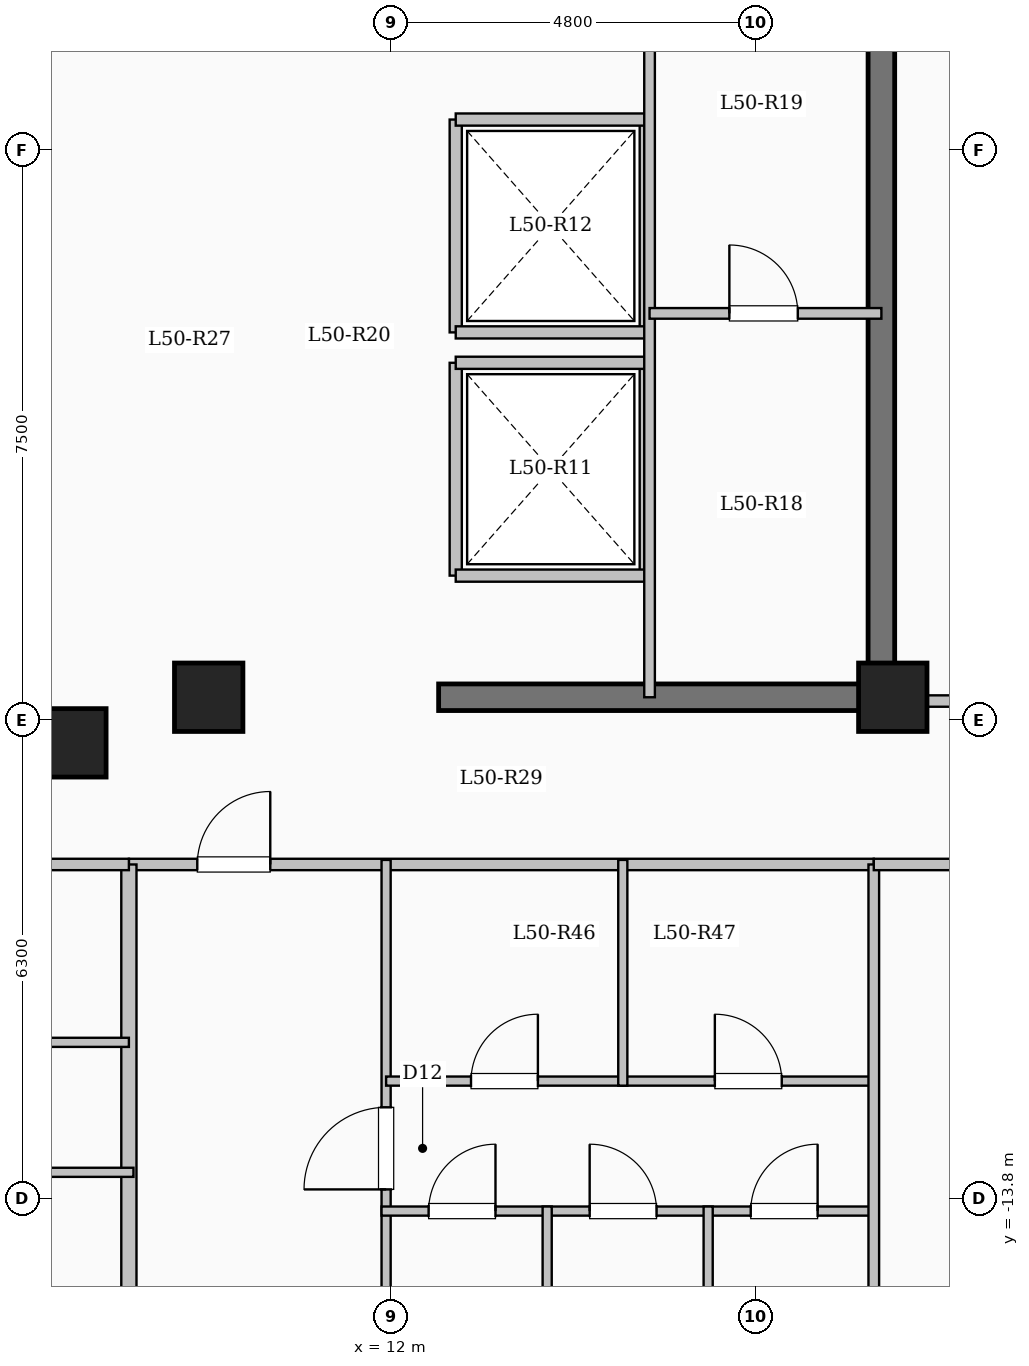
"""IFC4 building model, lengths in metres.
Left out: names, types, materials, properties, quantities, classifications, styles, units other than length and angle.
Written with IfcOpenShell. Run it as: python <this file> out.ifc"""

import sys

from ifc_helpers import new_model, si_unit, direction, frame, frame_2d, origin, origin_2d, place, context, subcontext, project, spatial, rectangle, extrude, element, fill, save


model = new_model("IFC4")
c1 = context("Model", 3, precision=1e-05, world=origin(), true_north=direction((0.0, 1.0)))
c2 = subcontext(c1, "Body", "Model", "MODEL_VIEW")
j1 = project(units=[si_unit("LENGTHUNIT", "METRE"), si_unit("PLANEANGLEUNIT", "RADIAN")], contexts=[c1])
p1 = place(None, origin())
s1 = spatial("IfcSite", under=j1, at=p1, CompositionType="ELEMENT")
p2 = place(p1, origin())
s2 = spatial("IfcBuilding", under=s1, at=p2, CompositionType="ELEMENT")
p3 = place(p2, frame((0.0, 0.0, 186.9)))
s3 = spatial("IfcBuildingStorey", under=s2, at=p3, CompositionType="ELEMENT", Elevation=186.9)
for number, where, z_axis, x_axis in (
    (1, (7.8, -7.8, 0.0), (0.0, 0.0, 1.0), (1.0, 0.0, 0.0)),
    (2, (9.6, -7.2, 0.0), (0.0, 0.0, 1.0), (1.0, 0.0, 0.0)),
    (3, (18.6, -7.2, 0.0), (0.0, 0.0, 1.0), (1.0, 0.0, 0.0)),
):
    element("IfcColumn", number, at=place(p3, frame(where, z_axis=z_axis, x_axis=x_axis)), inside=s3, PredefinedType="COLUMN", context=c2, shape_type="SweptSolid", body=[
        extrude(rectangle(XDim=0.9, YDim=0.9, at=origin_2d()), origin(), (0.0, 0.0, 1.0), 3.35),
    ])
for number, where, z_axis, x_axis in (
    (4, (12.85, -5.6, 0.0), (0.0, 0.0, 1.0), (0.0, 1.0, 0.0)),
    (5, (15.35, -5.6, 0.0), (0.0, 0.0, 1.0), (0.0, 1.0, 0.0)),
):
    element("IfcWall", number, at=place(p3, frame(where, z_axis=z_axis, x_axis=x_axis)), inside=s3, PredefinedType="SOLIDWALL", context=c2, shape_type="SweptSolid", body=[
        extrude(rectangle(XDim=2.8, YDim=0.16, at=frame_2d((1.4, 0.0))), origin(), (0.0, 0.0, 1.0), 3.1),
    ])
for number, where, z_axis, x_axis in (
    (6, (12.85, -5.6, 0.0), (0.0, 0.0, 1.0), (1.0, 0.0, 0.0)),
    (7, (12.85, -2.8, 0.0), (0.0, 0.0, 1.0), (1.0, 0.0, 0.0)),
):
    element("IfcWall", number, at=place(p3, frame(where, z_axis=z_axis, x_axis=x_axis)), inside=s3, PredefinedType="SOLIDWALL", context=c2, shape_type="SweptSolid", body=[
        extrude(rectangle(XDim=2.5, YDim=0.16, at=frame_2d((1.25, 0.0))), origin(), (0.0, 0.0, 1.0), 3.1),
    ])
for number, where, z_axis, x_axis in (
    (8, (12.85, -2.4, 0.0), (0.0, 0.0, 1.0), (0.0, 1.0, 0.0)),
    (9, (15.35, -2.4, 0.0), (0.0, 0.0, 1.0), (0.0, 1.0, 0.0)),
):
    element("IfcWall", number, at=place(p3, frame(where, z_axis=z_axis, x_axis=x_axis)), inside=s3, PredefinedType="SOLIDWALL", context=c2, shape_type="SweptSolid", body=[
        extrude(rectangle(XDim=2.8, YDim=0.16, at=frame_2d((1.4, 0.0))), origin(), (0.0, 0.0, 1.0), 3.1),
    ])
for number, where, z_axis, x_axis in (
    (10, (12.85, -2.4, 0.0), (0.0, 0.0, 1.0), (1.0, 0.0, 0.0)),
    (11, (12.85, 0.4, 0.0), (0.0, 0.0, 1.0), (1.0, 0.0, 0.0)),
):
    element("IfcWall", number, at=place(p3, frame(where, z_axis=z_axis, x_axis=x_axis)), inside=s3, PredefinedType="SOLIDWALL", context=c2, shape_type="SweptSolid", body=[
        extrude(rectangle(XDim=2.5, YDim=0.16, at=frame_2d((1.25, 0.0))), origin(), (0.0, 0.0, 1.0), 3.1),
    ])
p4 = place(p3, frame((18.45, -7.375, 0.0), z_axis=(0.0, 0.0, 1.0), x_axis=(0.0, 1.0, 0.0)))
e12 = element("IfcWall", 12, at=p4, inside=s3, PredefinedType="SHEAR", context=c2, shape_type="SweptSolid", body=[
    extrude(rectangle(XDim=14.05, YDim=0.35, at=frame_2d((7.025, 0.0))), origin(), (0.0, 0.0, 1.0), 3.35),
])
p5 = place(p3, frame((12.625, -7.2, 0.0), z_axis=(0.0, 0.0, 1.0), x_axis=(1.0, 0.0, 0.0)))
e13 = element("IfcWall", 13, at=p5, inside=s3, PredefinedType="SHEAR", context=c2, shape_type="SweptSolid", body=[
    extrude(rectangle(XDim=6.0, YDim=0.35, at=frame_2d((3.0, 0.0))), origin(), (0.0, 0.0, 1.0), 3.35),
])
p6 = place(p3, frame((15.4, -7.2, 0.0), z_axis=(0.0, 0.0, 1.0), x_axis=(0.0, 1.0, 0.0)))
e14 = element("IfcWall", 14, at=p6, inside=s3, PredefinedType="PARTITIONING", context=c2, shape_type="SweptSolid", body=[
    extrude(rectangle(XDim=10.45, YDim=0.14, at=frame_2d((5.225, 0.0))), origin(), (0.0, 0.0, 1.0), 3.1),
])
p7 = place(p6, frame((9.25, 0.0, 0.0)))
e15 = element("IfcOpeningElement", 15, at=p7, cuts=e14, PredefinedType="OPENING", context=c2, shape_type="SweptSolid", body=[
    extrude(rectangle(XDim=0.9, YDim=2.08, at=frame_2d((0.45, 1.04))), frame((0.0, 0.08, 0.0), z_axis=(0.0, -1.0, 0.0), x_axis=(1.0, 0.0, 0.0)), (0.0, 0.0, 1.0), 0.16),
])
p8 = place(p3, frame((15.4, -2.15, 0.0), z_axis=(0.0, 0.0, 1.0), x_axis=(1.0, 0.0, 0.0)))
e16 = element("IfcWall", 16, at=p8, inside=s3, PredefinedType="PARTITIONING", context=c2, shape_type="SweptSolid", body=[
    extrude(rectangle(XDim=3.05, YDim=0.14, at=frame_2d((1.525, 0.0))), origin(), (0.0, 0.0, 1.0), 3.1),
])
p9 = place(p8, frame((1.05, 0.0, 0.0)))
e17 = element("IfcOpeningElement", 17, at=p9, cuts=e16, PredefinedType="OPENING", context=c2, shape_type="SweptSolid", body=[
    extrude(rectangle(XDim=0.9, YDim=2.08, at=frame_2d((0.45, 1.04))), frame((0.0, 0.08, 0.0), z_axis=(0.0, -1.0, 0.0), x_axis=(1.0, 0.0, 0.0)), (0.0, 0.0, 1.0), 0.16),
])
p10 = place(p3, frame((8.55, -9.4, 0.0), z_axis=(0.0, 0.0, 1.0), x_axis=(1.0, 0.0, 0.0)))
e18 = element("IfcWall", 18, at=p10, inside=s3, PredefinedType="PARTITIONING", context=c2, shape_type="SweptSolid", body=[
    extrude(rectangle(XDim=9.8, YDim=0.15, at=frame_2d((4.9, 0.0))), origin(), (0.0, 0.0, 1.0), 3.1),
])
p11 = place(p10, frame((0.9, 0.0, 0.0)))
e19 = element("IfcOpeningElement", 19, at=p11, cuts=e18, PredefinedType="OPENING", context=c2, shape_type="SweptSolid", body=[
    extrude(rectangle(XDim=0.96, YDim=2.15, at=frame_2d((0.48, 1.075))), frame((0.0, 0.085, 0.0), z_axis=(0.0, -1.0, 0.0), x_axis=(1.0, 0.0, 0.0)), (0.0, 0.0, 1.0), 0.17),
])
p12 = place(p3, frame((11.934, -20.9, 0.0), z_axis=(0.0, 0.0, 1.0), x_axis=(0.0, 1.0, 0.0)))
e20 = element("IfcWall", 20, at=p12, inside=s3, PredefinedType="PARTITIONING", context=c2, shape_type="SweptSolid", body=[
    extrude(rectangle(XDim=11.56, YDim=0.12, at=frame_2d((5.78, 0.0))), origin(), (0.0, 0.0, 1.0), 3.1),
])
p13 = place(p12, frame((7.225, 0.0, 0.0)))
e21 = element("IfcOpeningElement", 21, at=p13, cuts=e20, PredefinedType="OPENING", context=c2, shape_type="SweptSolid", body=[
    extrude(rectangle(XDim=1.08, YDim=2.15, at=frame_2d((0.54, 1.075))), frame((0.0, 0.07, 0.0), z_axis=(0.0, -1.0, 0.0), x_axis=(1.0, 0.0, 0.0)), (0.0, 0.0, 1.0), 0.14),
])
p14 = place(p3, frame((11.934, -12.25, 0.0), z_axis=(0.0, 0.0, 1.0), x_axis=(1.0, 0.0, 0.0)))
e22 = element("IfcWall", 22, at=p14, inside=s3, PredefinedType="PARTITIONING", context=c2, shape_type="SweptSolid", body=[
    extrude(rectangle(XDim=3.114, YDim=0.12, at=frame_2d((1.557, 0.0))), origin(), (0.0, 0.0, 1.0), 2.725),
])
p15 = place(p14, frame((1.117, 0.0, 0.0)))
e23 = element("IfcOpeningElement", 23, at=p15, cuts=e22, PredefinedType="OPENING", context=c2, shape_type="SweptSolid", body=[
    extrude(rectangle(XDim=0.88, YDim=2.1, at=frame_2d((0.44, 1.05))), frame((0.0, 0.07, 0.0), z_axis=(0.0, -1.0, 0.0), x_axis=(1.0, 0.0, 0.0)), (0.0, 0.0, 1.0), 0.14),
])
p16 = place(p3, frame((15.048, -12.25, 0.0), z_axis=(0.0, 0.0, 1.0), x_axis=(1.0, 0.0, 0.0)))
e24 = element("IfcWall", 24, at=p16, inside=s3, PredefinedType="PARTITIONING", context=c2, shape_type="SweptSolid", body=[
    extrude(rectangle(XDim=3.302, YDim=0.12, at=frame_2d((1.651, 0.0))), origin(), (0.0, 0.0, 1.0), 3.1),
])
p17 = place(p16, frame((1.211, 0.0, 0.0)))
e25 = element("IfcOpeningElement", 25, at=p17, cuts=e24, PredefinedType="OPENING", context=c2, shape_type="SweptSolid", body=[
    extrude(rectangle(XDim=0.88, YDim=2.1, at=frame_2d((0.44, 1.05))), frame((0.0, 0.07, 0.0), z_axis=(0.0, -1.0, 0.0), x_axis=(1.0, 0.0, 0.0)), (0.0, 0.0, 1.0), 0.14),
])
p18 = place(p3, frame((11.874, -13.96, 0.0), z_axis=(0.0, 0.0, 1.0), x_axis=(1.0, 0.0, 0.0)))
e26 = element("IfcWall", 26, at=p18, inside=s3, PredefinedType="PARTITIONING", context=c2, shape_type="SweptSolid", body=[
    extrude(rectangle(XDim=6.536, YDim=0.12, at=frame_2d((3.268, 0.0))), origin(), (0.0, 0.0, 1.0), 2.725),
])
p19 = place(p18, frame((0.619, 0.0, 0.0)))
e27 = element("IfcOpeningElement", 27, at=p19, cuts=e26, PredefinedType="OPENING", context=c2, shape_type="SweptSolid", body=[
    extrude(rectangle(XDim=0.88, YDim=2.1, at=frame_2d((0.44, 1.05))), frame((0.0, 0.07, 0.0), z_axis=(0.0, -1.0, 0.0), x_axis=(1.0, 0.0, 0.0)), (0.0, 0.0, 1.0), 0.14),
])
p20 = place(p18, frame((2.738, 0.0, 0.0)))
e28 = element("IfcOpeningElement", 28, at=p20, cuts=e26, PredefinedType="OPENING", context=c2, shape_type="SweptSolid", body=[
    extrude(rectangle(XDim=0.88, YDim=2.1, at=frame_2d((0.44, 1.05))), frame((0.0, 0.07, 0.0), z_axis=(0.0, -1.0, 0.0), x_axis=(1.0, 0.0, 0.0)), (0.0, 0.0, 1.0), 0.14),
])
p21 = place(p18, frame((4.857, 0.0, 0.0)))
e29 = element("IfcOpeningElement", 29, at=p21, cuts=e26, PredefinedType="OPENING", context=c2, shape_type="SweptSolid", body=[
    extrude(rectangle(XDim=0.88, YDim=2.1, at=frame_2d((0.44, 1.05))), frame((0.0, 0.07, 0.0), z_axis=(0.0, -1.0, 0.0), x_axis=(1.0, 0.0, 0.0)), (0.0, 0.0, 1.0), 0.14),
])
p22 = place(p3, frame((15.048, -12.31, 0.0), z_axis=(0.0, 0.0, 1.0), x_axis=(0.0, 1.0, 0.0)))
e30 = element("IfcWall", 30, at=p22, inside=s3, PredefinedType="PARTITIONING", context=c2, shape_type="SweptSolid", body=[
    extrude(rectangle(XDim=2.97, YDim=0.12, at=frame_2d((1.485, 0.0))), origin(), (0.0, 0.0, 1.0), 2.585),
])
for number, where, z_axis, x_axis in (
    (31, (14.053, -20.9, 0.0), (0.0, 0.0, 1.0), (0.0, 1.0, 0.0)),
    (32, (16.171, -20.9, 0.0), (0.0, 0.0, 1.0), (0.0, 1.0, 0.0)),
):
    element("IfcWall", number, at=place(p3, frame(where, z_axis=z_axis, x_axis=x_axis)), inside=s3, PredefinedType="PARTITIONING", context=c2, shape_type="SweptSolid", body=[
        extrude(rectangle(XDim=7.0, YDim=0.12, at=frame_2d((3.5, 0.0))), origin(), (0.0, 0.0, 1.0), 3.1),
    ])
p23 = place(p3, frame((8.55, -21.504, 0.0), z_axis=(0.0, 0.0, 1.0), x_axis=(0.0, 1.0, 0.0)))
e33 = element("IfcWall", 33, at=p23, inside=s3, PredefinedType="SOLIDWALL", context=c2, shape_type="SweptSolid", body=[
    extrude(rectangle(XDim=12.104, YDim=0.2, at=frame_2d((6.052, 0.0))), origin(), (0.0, 0.0, 1.0), 3.1),
])
p24 = place(p3, frame((-8.55, -9.4, 0.0), z_axis=(0.0, 0.0, 1.0), x_axis=(1.0, 0.0, 0.0)))
e34 = element("IfcWall", 34, at=p24, inside=s3, PredefinedType="PARTITIONING", context=c2, shape_type="SweptSolid", body=[
    extrude(rectangle(XDim=17.1, YDim=0.15, at=frame_2d((8.55, 0.0))), origin(), (0.0, 0.0, 1.0), 3.1),
])
p25 = place(p24, frame((1.9, 0.0, 0.0)))
e35 = element("IfcOpeningElement", 35, at=p25, cuts=e34, PredefinedType="OPENING", context=c2, shape_type="SweptSolid", body=[
    extrude(rectangle(XDim=0.96, YDim=2.15, at=frame_2d((0.48, 1.075))), frame((0.0, 0.085, 0.0), z_axis=(0.0, -1.0, 0.0), x_axis=(1.0, 0.0, 0.0)), (0.0, 0.0, 1.0), 0.17),
])
p26 = place(p3, frame((3.697, -11.74, 0.0), z_axis=(0.0, 0.0, 1.0), x_axis=(1.0, 0.0, 0.0)))
e36 = element("IfcWall", 36, at=p26, inside=s3, PredefinedType="PARTITIONING", context=c2, shape_type="SweptSolid", body=[
    extrude(rectangle(XDim=4.853, YDim=0.12, at=frame_2d((2.427, 0.0))), origin(), (0.0, 0.0, 1.0), 3.1),
])
p27 = place(p26, frame((1.987, 0.0, 0.0)))
e37 = element("IfcOpeningElement", 37, at=p27, cuts=e36, PredefinedType="OPENING", context=c2, shape_type="SweptSolid", body=[
    extrude(rectangle(XDim=0.88, YDim=2.1, at=frame_2d((0.44, 1.05))), frame((0.0, 0.07, 0.0), z_axis=(0.0, -1.0, 0.0), x_axis=(1.0, 0.0, 0.0)), (0.0, 0.0, 1.0), 0.14),
])
p28 = place(p3, frame((-1.756, -13.45, 0.0), z_axis=(0.0, 0.0, 1.0), x_axis=(1.0, 0.0, 0.0)))
e38 = element("IfcWall", 38, at=p28, inside=s3, PredefinedType="PARTITIONING", context=c2, shape_type="SweptSolid", body=[
    extrude(rectangle(XDim=10.366, YDim=0.12, at=frame_2d((5.183, 0.0))), origin(), (0.0, 0.0, 1.0), 3.1),
])
p29 = place(p28, frame((1.256, 0.0, 0.0)))
e39 = element("IfcOpeningElement", 39, at=p29, cuts=e38, PredefinedType="OPENING", context=c2, shape_type="SweptSolid", body=[
    extrude(rectangle(XDim=0.88, YDim=2.1, at=frame_2d((0.44, 1.05))), frame((0.0, 0.07, 0.0), z_axis=(0.0, -1.0, 0.0), x_axis=(1.0, 0.0, 0.0)), (0.0, 0.0, 1.0), 0.14),
])
p30 = place(p28, frame((4.648, 0.0, 0.0)))
e40 = element("IfcOpeningElement", 40, at=p30, cuts=e38, PredefinedType="OPENING", context=c2, shape_type="SweptSolid", body=[
    extrude(rectangle(XDim=0.88, YDim=2.1, at=frame_2d((0.44, 1.05))), frame((0.0, 0.07, 0.0), z_axis=(0.0, -1.0, 0.0), x_axis=(1.0, 0.0, 0.0)), (0.0, 0.0, 1.0), 0.14),
])
p31 = place(p28, frame((8.04, 0.0, 0.0)))
e41 = element("IfcOpeningElement", 41, at=p31, cuts=e38, PredefinedType="OPENING", context=c2, shape_type="SweptSolid", body=[
    extrude(rectangle(XDim=0.88, YDim=2.1, at=frame_2d((0.44, 1.05))), frame((0.0, 0.07, 0.0), z_axis=(0.0, -1.0, 0.0), x_axis=(1.0, 0.0, 0.0)), (0.0, 0.0, 1.0), 0.14),
])
p32 = place(p3, frame((18.45, -7.25, 0.0), z_axis=(0.0, 0.0, 1.0), x_axis=(1.0, 0.0, 0.0)))
e42 = element("IfcWall", 42, at=p32, inside=s3, PredefinedType="PARTITIONING", context=c2, shape_type="SweptSolid", body=[
    extrude(rectangle(XDim=5.13, YDim=0.15, at=frame_2d((2.565, 0.0))), origin(), (0.0, 0.0, 1.0), 3.1),
])
p33 = place(p32, frame((1.95, 0.0, 0.0)))
e43 = element("IfcOpeningElement", 43, at=p33, cuts=e42, PredefinedType="OPENING", context=c2, shape_type="SweptSolid", body=[
    extrude(rectangle(XDim=1.08, YDim=2.15, at=frame_2d((0.54, 1.075))), frame((0.0, 0.085, 0.0), z_axis=(0.0, -1.0, 0.0), x_axis=(1.0, 0.0, 0.0)), (0.0, 0.0, 1.0), 0.17),
])
p34 = place(p3, frame((18.35, -17.25, 0.0), z_axis=(0.0, 0.0, 1.0), x_axis=(0.0, 1.0, 0.0)))
e44 = element("IfcWall", 44, at=p34, inside=s3, PredefinedType="PARTITIONING", context=c2, shape_type="SweptSolid", body=[
    extrude(rectangle(XDim=7.85, YDim=0.14, at=frame_2d((3.925, 0.0))), origin(), (0.0, 0.0, 1.0), 3.1),
])
p35 = place(p3, frame((18.35, -9.4, 0.0), z_axis=(0.0, 0.0, 1.0), x_axis=(1.0, 0.0, 0.0)))
e45 = element("IfcWall", 45, at=p35, inside=s3, PredefinedType="PARTITIONING", context=c2, shape_type="SweptSolid", body=[
    extrude(rectangle(XDim=5.23, YDim=0.15, at=frame_2d((2.615, 0.0))), origin(), (0.0, 0.0, 1.0), 3.1),
])
p36 = place(p35, frame((2.14, 0.0, 0.0)))
e46 = element("IfcOpeningElement", 46, at=p36, cuts=e45, PredefinedType="OPENING", context=c2, shape_type="SweptSolid", body=[
    extrude(rectangle(XDim=0.95, YDim=2.15, at=frame_2d((0.475, 1.075))), frame((0.0, 0.085, 0.0), z_axis=(0.0, -1.0, 0.0), x_axis=(1.0, 0.0, 0.0)), (0.0, 0.0, 1.0), 0.17),
])
p37 = place(p9, origin())
e47 = element("IfcDoor", 47, at=p37, inside=s3, OperationType="SINGLE_SWING_LEFT", PredefinedType="DOOR", context=c2, shape_type="SweptSolid", body=[
    extrude(rectangle(XDim=0.9, YDim=2.08, at=frame_2d((0.45, 1.04))), frame((0.0, 0.025, 0.0), z_axis=(0.0, -1.0, 0.0), x_axis=(1.0, 0.0, 0.0)), (0.0, 0.0, 1.0), 0.05),
])
fill(e17, e47)
p38 = place(p11, origin())
e48 = element("IfcDoor", 48, at=p38, inside=s3, OperationType="SINGLE_SWING_RIGHT", PredefinedType="DOOR", context=c2, shape_type="SweptSolid", body=[
    extrude(rectangle(XDim=0.96, YDim=2.15, at=frame_2d((0.48, 1.075))), frame((0.0, 0.025, 0.0), z_axis=(0.0, -1.0, 0.0), x_axis=(1.0, 0.0, 0.0)), (0.0, 0.0, 1.0), 0.05),
])
fill(e19, e48)
p39 = place(p13, origin())
e49 = element("IfcDoor", 49, at=p39, inside=s3, OperationType="SINGLE_SWING_LEFT", PredefinedType="DOOR", context=c2, shape_type="SweptSolid", body=[
    extrude(rectangle(XDim=1.08, YDim=2.15, at=frame_2d((0.54, 1.075))), frame((0.0, 0.025, 0.0), z_axis=(0.0, -1.0, 0.0), x_axis=(1.0, 0.0, 0.0)), (0.0, 0.0, 1.0), 0.05),
])
fill(e21, e49)
p40 = place(p15, origin())
e50 = element("IfcDoor", 50, at=p40, inside=s3, OperationType="SINGLE_SWING_RIGHT", PredefinedType="DOOR", context=c2, shape_type="SweptSolid", body=[
    extrude(rectangle(XDim=0.88, YDim=2.1, at=frame_2d((0.44, 1.05))), frame((0.0, 0.025, 0.0), z_axis=(0.0, -1.0, 0.0), x_axis=(1.0, 0.0, 0.0)), (0.0, 0.0, 1.0), 0.05),
])
fill(e23, e50)
p41 = place(p17, origin())
e51 = element("IfcDoor", 51, at=p41, inside=s3, OperationType="SINGLE_SWING_LEFT", PredefinedType="DOOR", context=c2, shape_type="SweptSolid", body=[
    extrude(rectangle(XDim=0.88, YDim=2.1, at=frame_2d((0.44, 1.05))), frame((0.0, 0.025, 0.0), z_axis=(0.0, -1.0, 0.0), x_axis=(1.0, 0.0, 0.0)), (0.0, 0.0, 1.0), 0.05),
])
fill(e25, e51)
p42 = place(p19, origin())
e52 = element("IfcDoor", 52, at=p42, inside=s3, OperationType="SINGLE_SWING_RIGHT", PredefinedType="DOOR", context=c2, shape_type="SweptSolid", body=[
    extrude(rectangle(XDim=0.88, YDim=2.1, at=frame_2d((0.44, 1.05))), frame((0.0, 0.025, 0.0), z_axis=(0.0, -1.0, 0.0), x_axis=(1.0, 0.0, 0.0)), (0.0, 0.0, 1.0), 0.05),
])
fill(e27, e52)
p43 = place(p20, origin())
e53 = element("IfcDoor", 53, at=p43, inside=s3, OperationType="SINGLE_SWING_LEFT", PredefinedType="DOOR", context=c2, shape_type="SweptSolid", body=[
    extrude(rectangle(XDim=0.88, YDim=2.1, at=frame_2d((0.44, 1.05))), frame((0.0, 0.025, 0.0), z_axis=(0.0, -1.0, 0.0), x_axis=(1.0, 0.0, 0.0)), (0.0, 0.0, 1.0), 0.05),
])
fill(e28, e53)
p44 = place(p21, origin())
e54 = element("IfcDoor", 54, at=p44, inside=s3, OperationType="SINGLE_SWING_RIGHT", PredefinedType="DOOR", context=c2, shape_type="SweptSolid", body=[
    extrude(rectangle(XDim=0.88, YDim=2.1, at=frame_2d((0.44, 1.05))), frame((0.0, 0.025, 0.0), z_axis=(0.0, -1.0, 0.0), x_axis=(1.0, 0.0, 0.0)), (0.0, 0.0, 1.0), 0.05),
])
fill(e29, e54)
save(model, sys.argv[1])
